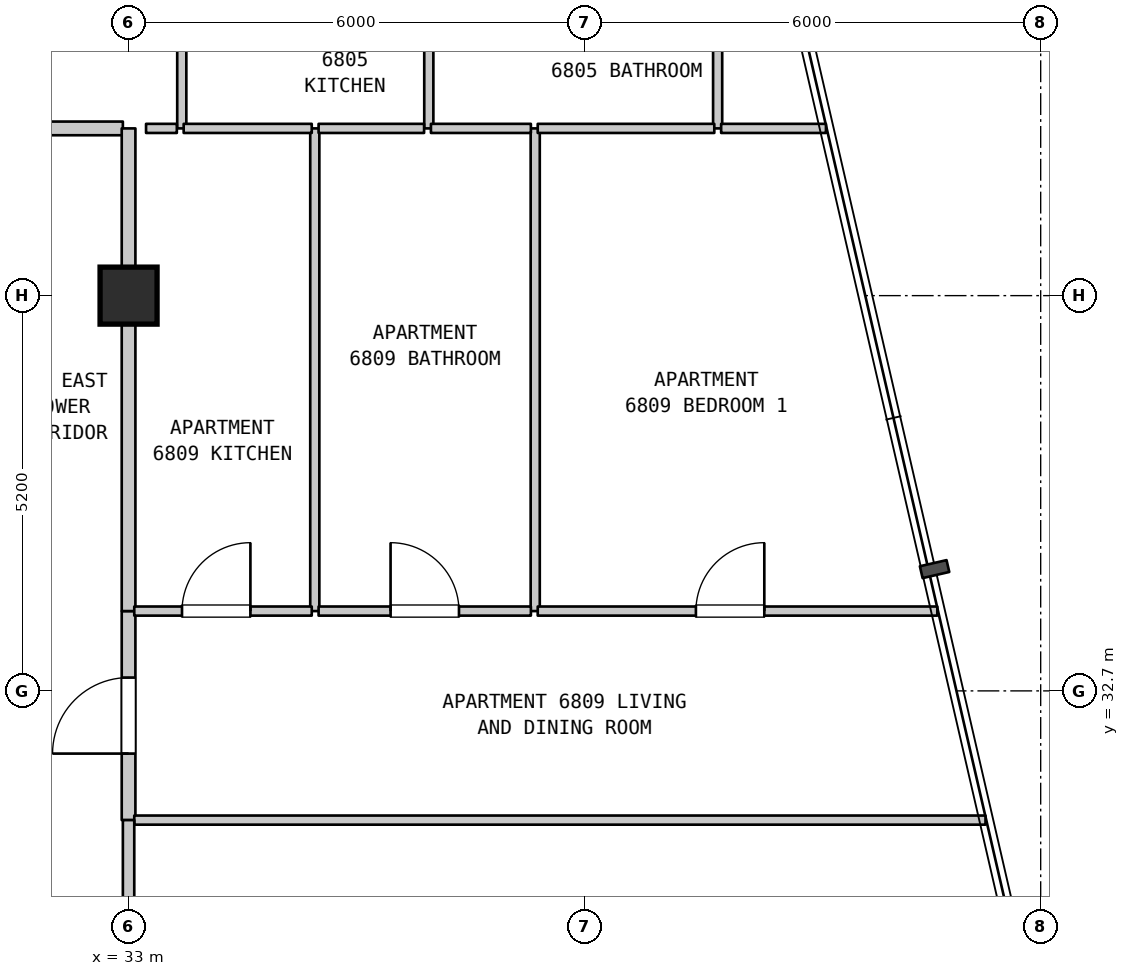
"""IFC4 building model, lengths in metres.
Left out: names, types, materials, properties, quantities, classifications, styles, units other than length and angle.
Written with IfcOpenShell. Run it as: python <this file> out.ifc"""

import sys

from ifc_helpers import new_model, si_unit, direction, frame, frame_2d, origin, origin_2d, place, context, subcontext, project, spatial, rectangle, extrude, element, fill, save


model = new_model("IFC4")
c1 = context("Model", 3, precision=1e-05, world=origin(), true_north=direction((0.0, 1.0)))
c2 = subcontext(c1, "Body", "Model", "MODEL_VIEW")
j1 = project(units=[si_unit("LENGTHUNIT", "METRE"), si_unit("PLANEANGLEUNIT", "RADIAN")], contexts=[c1])
p1 = place(None, origin())
s1 = spatial("IfcSite", under=j1, at=p1, CompositionType="ELEMENT")
p2 = place(p1, origin())
s2 = spatial("IfcBuilding", under=s1, at=p2, CompositionType="ELEMENT")
p3 = place(p2, frame((0.0, 0.0, 273.2)))
s3 = spatial("IfcBuildingStorey", under=s2, at=p3, CompositionType="ELEMENT", Elevation=273.2)
p4 = place(p3, frame((33.0, 37.9, 0.0), z_axis=(0.0, 0.0, 1.0), x_axis=(1.0, 0.0, 0.0)))
e1 = element("IfcColumn", 1, at=p4, inside=s3, PredefinedType="COLUMN", context=c2, shape_type="SweptSolid", body=[
    extrude(rectangle(XDim=0.75, YDim=0.75, at=origin_2d()), origin(), (0.0, 0.0, 1.0), 3.7),
])
p5 = place(p3, frame((33.0, 31.0, 0.0), z_axis=(0.0, 0.0, 1.0), x_axis=(0.0, 1.0, 0.0)))
e2 = element("IfcWall", 2, at=p5, inside=s3, PredefinedType="STANDARD", context=c2, shape_type="SweptSolid", body=[
    extrude(rectangle(XDim=2.75, YDim=0.18, at=frame_2d((1.375, 0.0))), origin(), (0.0, 0.0, 1.0), 2.89),
])
p6 = place(p5, frame((0.875, 0.0, 0.0)))
e3 = element("IfcOpeningElement", 3, at=p6, cuts=e2, PredefinedType="OPENING", context=c2, shape_type="SweptSolid", body=[
    extrude(rectangle(XDim=1.0, YDim=2.15, at=frame_2d((0.5, 1.075))), frame((0.0, 0.1, 0.0), z_axis=(0.0, -1.0, 0.0), x_axis=(1.0, 0.0, 0.0)), (0.0, 0.0, 1.0), 0.2),
])
p7 = place(p3, frame((33.0, 33.75, 0.0), z_axis=(0.0, 0.0, 1.0), x_axis=(0.0, 1.0, 0.0)))
e4 = element("IfcWall", 4, at=p7, inside=s3, PredefinedType="STANDARD", context=c2, shape_type="SweptSolid", body=[
    extrude(rectangle(XDim=4.15, YDim=0.18, at=frame_2d((2.075, 0.0))), origin(), (0.0, 0.0, 1.0), 2.89),
])
p8 = place(p3, frame((33.7, 40.1, 0.0), z_axis=(0.0, 0.0, 1.0), x_axis=(0.0, 1.0, 0.0)))
e5 = element("IfcWall", 5, at=p8, inside=s3, PredefinedType="PARTITIONING", context=c2, shape_type="SweptSolid", body=[
    extrude(rectangle(XDim=2.3, YDim=0.12, at=frame_2d((1.15, 0.0))), origin(), (0.0, 0.0, 1.0), 3.39),
])
p9 = place(p3, frame((35.45, 33.75, 0.0), z_axis=(0.0, 0.0, 1.0), x_axis=(0.0, 1.0, 0.0)))
e6 = element("IfcWall", 6, at=p9, inside=s3, PredefinedType="PARTITIONING", context=c2, shape_type="SweptSolid", body=[
    extrude(rectangle(XDim=6.35, YDim=0.12, at=frame_2d((3.175, 0.0))), origin(), (0.0, 0.0, 1.0), 3.39),
])
p10 = place(p3, frame((36.95, 40.1, 0.0), z_axis=(0.0, 0.0, 1.0), x_axis=(0.0, 1.0, 0.0)))
e7 = element("IfcWall", 7, at=p10, inside=s3, PredefinedType="PARTITIONING", context=c2, shape_type="SweptSolid", body=[
    extrude(rectangle(XDim=2.3, YDim=0.12, at=frame_2d((1.15, 0.0))), origin(), (0.0, 0.0, 1.0), 3.39),
])
p11 = place(p3, frame((38.35, 33.75, 0.0), z_axis=(0.0, 0.0, 1.0), x_axis=(0.0, 1.0, 0.0)))
e8 = element("IfcWall", 8, at=p11, inside=s3, PredefinedType="PARTITIONING", context=c2, shape_type="SweptSolid", body=[
    extrude(rectangle(XDim=6.35, YDim=0.12, at=frame_2d((3.175, 0.0))), origin(), (0.0, 0.0, 1.0), 3.39),
])
p12 = place(p3, frame((40.75, 40.1, 0.0), z_axis=(0.0, 0.0, 1.0), x_axis=(0.0, 1.0, 0.0)))
e9 = element("IfcWall", 9, at=p12, inside=s3, PredefinedType="PARTITIONING", context=c2, shape_type="SweptSolid", body=[
    extrude(rectangle(XDim=2.3, YDim=0.12, at=frame_2d((1.15, 0.0))), origin(), (0.0, 0.0, 1.0), 3.39),
])
p13 = place(p3, frame((33.075, 31.0, 0.0), z_axis=(0.0, 0.0, 1.0), x_axis=(1.0, 0.0, 0.0)))
e10 = element("IfcWall", 10, at=p13, inside=s3, PredefinedType="PARTITIONING", context=c2, shape_type="SweptSolid", body=[
    extrude(rectangle(XDim=11.199, YDim=0.12, at=frame_2d((5.6, 0.0))), origin(), (0.0, 0.0, 1.0), 3.39),
])
p14 = place(p3, frame((33.075, 33.75, 0.0), z_axis=(0.0, 0.0, 1.0), x_axis=(1.0, 0.0, 0.0)))
e11 = element("IfcWall", 11, at=p14, inside=s3, PredefinedType="PARTITIONING", context=c2, shape_type="SweptSolid", body=[
    extrude(rectangle(XDim=2.335, YDim=0.12, at=frame_2d((1.167, 0.0))), origin(), (0.0, 0.0, 1.0), 3.39),
])
p15 = place(p14, frame((0.628, 0.0, 0.0)))
e12 = element("IfcOpeningElement", 12, at=p15, cuts=e11, PredefinedType="OPENING", context=c2, shape_type="SweptSolid", body=[
    extrude(rectangle(XDim=0.9, YDim=2.15, at=frame_2d((0.45, 1.075))), frame((0.0, 0.07, 0.0), z_axis=(0.0, -1.0, 0.0), x_axis=(1.0, 0.0, 0.0)), (0.0, 0.0, 1.0), 0.14),
])
p16 = place(p3, frame((35.5, 33.75, 0.0), z_axis=(0.0, 0.0, 1.0), x_axis=(1.0, 0.0, 0.0)))
e13 = element("IfcWall", 13, at=p16, inside=s3, PredefinedType="PARTITIONING", context=c2, shape_type="SweptSolid", body=[
    extrude(rectangle(XDim=2.793, YDim=0.12, at=frame_2d((1.396, 0.0))), origin(), (0.0, 0.0, 1.0), 3.39),
])
p17 = place(p16, frame((0.947, 0.0, 0.0)))
e14 = element("IfcOpeningElement", 14, at=p17, cuts=e13, PredefinedType="OPENING", context=c2, shape_type="SweptSolid", body=[
    extrude(rectangle(XDim=0.9, YDim=2.1, at=frame_2d((0.45, 1.05))), frame((0.0, 0.07, 0.0), z_axis=(0.0, -1.0, 0.0), x_axis=(1.0, 0.0, 0.0)), (0.0, 0.0, 1.0), 0.14),
])
p18 = place(p3, frame((38.383, 33.75, 0.0), z_axis=(0.0, 0.0, 1.0), x_axis=(1.0, 0.0, 0.0)))
e15 = element("IfcWall", 15, at=p18, inside=s3, PredefinedType="PARTITIONING", context=c2, shape_type="SweptSolid", body=[
    extrude(rectangle(XDim=5.257, YDim=0.12, at=frame_2d((2.628, 0.0))), origin(), (0.0, 0.0, 1.0), 3.39),
])
p19 = place(p18, frame((2.081, 0.0, 0.0)))
e16 = element("IfcOpeningElement", 16, at=p19, cuts=e15, PredefinedType="OPENING", context=c2, shape_type="SweptSolid", body=[
    extrude(rectangle(XDim=0.9, YDim=2.15, at=frame_2d((0.45, 1.075))), frame((0.0, 0.07, 0.0), z_axis=(0.0, -1.0, 0.0), x_axis=(1.0, 0.0, 0.0)), (0.0, 0.0, 1.0), 0.14),
])
p20 = place(p3, frame((23.36, 40.1, 0.0), z_axis=(0.0, 0.0, 1.0), x_axis=(1.0, 0.0, 0.0)))
e17 = element("IfcWall", 17, at=p20, inside=s3, PredefinedType="STANDARD", context=c2, shape_type="SweptSolid", body=[
    extrude(rectangle(XDim=9.565, YDim=0.18, at=frame_2d((4.782, 0.0))), origin(), (0.0, 0.0, 1.0), 3.39),
])
p21 = place(p20, frame((1.97, 0.0, 0.0)))
e18 = element("IfcOpeningElement", 18, at=p21, cuts=e17, PredefinedType="OPENING", context=c2, shape_type="SweptSolid", body=[
    extrude(rectangle(XDim=1.0, YDim=2.15, at=frame_2d((0.5, 1.075))), frame((0.0, 0.1, 0.0), z_axis=(0.0, -1.0, 0.0), x_axis=(1.0, 0.0, 0.0)), (0.0, 0.0, 1.0), 0.2),
])
p22 = place(p20, frame((6.793, 0.0, 0.0)))
e19 = element("IfcOpeningElement", 19, at=p22, cuts=e17, PredefinedType="OPENING", context=c2, shape_type="SweptSolid", body=[
    extrude(rectangle(XDim=1.0, YDim=2.15, at=frame_2d((0.5, 1.075))), frame((0.0, 0.1, 0.0), z_axis=(0.0, -1.0, 0.0), x_axis=(1.0, 0.0, 0.0)), (0.0, 0.0, 1.0), 0.2),
])
p23 = place(p3, frame((33.23, 40.1, 0.0), z_axis=(0.0, 0.0, 1.0), x_axis=(1.0, 0.0, 0.0)))
e20 = element("IfcWall", 20, at=p23, inside=s3, PredefinedType="PARTITIONING", context=c2, shape_type="SweptSolid", body=[
    extrude(rectangle(XDim=0.405, YDim=0.12, at=frame_2d((0.203, 0.0))), origin(), (0.0, 0.0, 1.0), 3.39),
])
p24 = place(p3, frame((33.725, 40.1, 0.0), z_axis=(0.0, 0.0, 1.0), x_axis=(1.0, 0.0, 0.0)))
e21 = element("IfcWall", 21, at=p24, inside=s3, PredefinedType="PARTITIONING", context=c2, shape_type="SweptSolid", body=[
    extrude(rectangle(XDim=1.685, YDim=0.12, at=frame_2d((0.842, 0.0))), origin(), (0.0, 0.0, 1.0), 3.39),
])
p25 = place(p3, frame((35.5, 40.1, 0.0), z_axis=(0.0, 0.0, 1.0), x_axis=(1.0, 0.0, 0.0)))
e22 = element("IfcWall", 22, at=p25, inside=s3, PredefinedType="PARTITIONING", context=c2, shape_type="SweptSolid", body=[
    extrude(rectangle(XDim=1.388, YDim=0.12, at=frame_2d((0.694, 0.0))), origin(), (0.0, 0.0, 1.0), 3.39),
])
p26 = place(p3, frame((36.978, 40.1, 0.0), z_axis=(0.0, 0.0, 1.0), x_axis=(1.0, 0.0, 0.0)))
e23 = element("IfcWall", 23, at=p26, inside=s3, PredefinedType="PARTITIONING", context=c2, shape_type="SweptSolid", body=[
    extrude(rectangle(XDim=1.315, YDim=0.12, at=frame_2d((0.657, 0.0))), origin(), (0.0, 0.0, 1.0), 3.39),
])
p27 = place(p3, frame((38.383, 40.1, 0.0), z_axis=(0.0, 0.0, 1.0), x_axis=(1.0, 0.0, 0.0)))
e24 = element("IfcWall", 24, at=p27, inside=s3, PredefinedType="PARTITIONING", context=c2, shape_type="SweptSolid", body=[
    extrude(rectangle(XDim=2.323, YDim=0.12, at=frame_2d((1.162, 0.0))), origin(), (0.0, 0.0, 1.0), 3.39),
])
p28 = place(p3, frame((40.796, 40.1, 0.0), z_axis=(0.0, 0.0, 1.0), x_axis=(1.0, 0.0, 0.0)))
e25 = element("IfcWall", 25, at=p28, inside=s3, PredefinedType="PARTITIONING", context=c2, shape_type="SweptSolid", body=[
    extrude(rectangle(XDim=1.379, YDim=0.12, at=frame_2d((0.689, 0.0))), origin(), (0.0, 0.0, 1.0), 3.39),
])
p29 = place(p3, frame((33.0, 27.9, 0.0), z_axis=(0.0, 0.0, 1.0), x_axis=(0.0, 1.0, 0.0)))
e26 = element("IfcWall", 26, at=p29, inside=s3, PredefinedType="STANDARD", context=c2, shape_type="SweptSolid", body=[
    extrude(rectangle(XDim=3.1, YDim=0.15, at=frame_2d((1.55, 0.0))), origin(), (0.0, 0.0, 1.0), 2.89),
])
p30 = place(p3, frame((33.0, 37.9, 0.0), z_axis=(0.0, 0.0, 1.0), x_axis=(0.0, 1.0, 0.0)))
e27 = element("IfcWall", 27, at=p30, inside=s3, PredefinedType="STANDARD", context=c2, shape_type="SweptSolid", body=[
    extrude(rectangle(XDim=2.2, YDim=0.18, at=frame_2d((1.1, 0.0))), origin(), (0.0, 0.0, 1.0), 2.79),
])
p31 = place(p6, origin())
e28 = element("IfcDoor", 28, at=p31, inside=s3, OperationType="SINGLE_SWING_LEFT", PredefinedType="DOOR", context=c2, shape_type="SweptSolid", body=[
    extrude(rectangle(XDim=1.0, YDim=2.15, at=frame_2d((0.5, 1.075))), frame((0.0, 0.025, 0.0), z_axis=(0.0, -1.0, 0.0), x_axis=(1.0, 0.0, 0.0)), (0.0, 0.0, 1.0), 0.05),
])
fill(e3, e28)
p32 = place(p15, origin())
e29 = element("IfcDoor", 29, at=p32, inside=s3, OperationType="SINGLE_SWING_RIGHT", PredefinedType="DOOR", context=c2, shape_type="SweptSolid", body=[
    extrude(rectangle(XDim=0.9, YDim=2.15, at=frame_2d((0.45, 1.075))), frame((0.0, 0.025, 0.0), z_axis=(0.0, -1.0, 0.0), x_axis=(1.0, 0.0, 0.0)), (0.0, 0.0, 1.0), 0.05),
])
fill(e12, e29)
p33 = place(p17, origin())
e30 = element("IfcDoor", 30, at=p33, inside=s3, OperationType="SINGLE_SWING_LEFT", PredefinedType="DOOR", context=c2, shape_type="SweptSolid", body=[
    extrude(rectangle(XDim=0.9, YDim=2.1, at=frame_2d((0.45, 1.05))), frame((0.0, 0.025, 0.0), z_axis=(0.0, -1.0, 0.0), x_axis=(1.0, 0.0, 0.0)), (0.0, 0.0, 1.0), 0.05),
])
fill(e14, e30)
p34 = place(p19, origin())
e31 = element("IfcDoor", 31, at=p34, inside=s3, OperationType="SINGLE_SWING_RIGHT", PredefinedType="DOOR", context=c2, shape_type="SweptSolid", body=[
    extrude(rectangle(XDim=0.9, YDim=2.15, at=frame_2d((0.45, 1.075))), frame((0.0, 0.025, 0.0), z_axis=(0.0, -1.0, 0.0), x_axis=(1.0, 0.0, 0.0)), (0.0, 0.0, 1.0), 0.05),
])
fill(e16, e31)
save(model, sys.argv[1])
